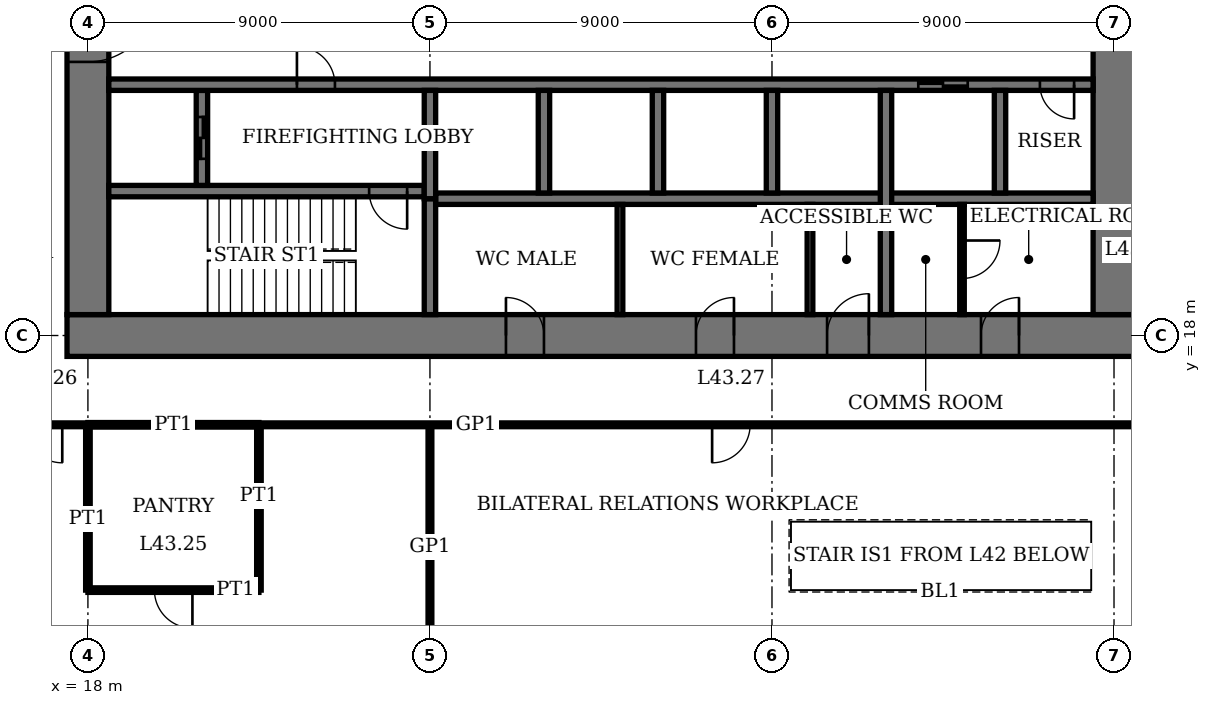
"""IFC4 building model, lengths in metres.
Left out: names, types, materials, properties, quantities, classifications, styles, units other than length and angle.
Written with IfcOpenShell. Run it as: python <this file> out.ifc"""

import sys

from ifc_helpers import new_model, si_unit, direction, frame, frame_2d, origin, place, context, subcontext, project, spatial, rectangle, extrude, element, fill, save


model = new_model("IFC4")
c1 = context("Model", 3, precision=1e-05, world=origin(), true_north=direction((0.0, 1.0)))
c2 = subcontext(c1, "Body", "Model", "MODEL_VIEW")
j1 = project(units=[si_unit("LENGTHUNIT", "METRE"), si_unit("PLANEANGLEUNIT", "RADIAN")], contexts=[c1])
p1 = place(None, origin())
s1 = spatial("IfcSite", under=j1, at=p1, CompositionType="ELEMENT")
p2 = place(p1, origin())
s2 = spatial("IfcBuilding", under=s1, at=p2, CompositionType="ELEMENT")
p3 = place(p2, frame((0.0, 0.0, 178.2)))
s3 = spatial("IfcBuildingStorey", under=s2, at=p3, CompositionType="ELEMENT", Elevation=178.2)
p4 = place(p3, frame((17.45, 18.0, 0.0), z_axis=(0.0, 0.0, 1.0), x_axis=(1.0, 0.0, 0.0)))
e1 = element("IfcWall", 1, at=p4, inside=s3, PredefinedType="SHEAR", context=c2, shape_type="SweptSolid", body=[
    extrude(rectangle(XDim=28.1, YDim=1.1, at=frame_2d((14.05, 0.0))), origin(), (0.0, 0.0, 1.0), 4.0),
])
p5 = place(p4, frame((11.55, 0.0, 0.0)))
e2 = element("IfcOpeningElement", 2, at=p5, cuts=e1, PredefinedType="OPENING", context=c2, shape_type="SweptSolid", body=[
    extrude(rectangle(XDim=1.0, YDim=2.4, at=frame_2d((0.5, 1.2))), frame((0.0, 0.56, 0.0), z_axis=(0.0, -1.0, 0.0), x_axis=(1.0, 0.0, 0.0)), (0.0, 0.0, 1.0), 1.12),
])
p6 = place(p4, frame((16.55, 0.0, 0.0)))
e3 = element("IfcOpeningElement", 3, at=p6, cuts=e1, PredefinedType="OPENING", context=c2, shape_type="SweptSolid", body=[
    extrude(rectangle(XDim=1.0, YDim=2.4, at=frame_2d((0.5, 1.2))), frame((0.0, 0.56, 0.0), z_axis=(0.0, -1.0, 0.0), x_axis=(1.0, 0.0, 0.0)), (0.0, 0.0, 1.0), 1.12),
])
p7 = place(p4, frame((20.0, 0.0, 0.0)))
e4 = element("IfcOpeningElement", 4, at=p7, cuts=e1, PredefinedType="OPENING", context=c2, shape_type="SweptSolid", body=[
    extrude(rectangle(XDim=1.1, YDim=2.4, at=frame_2d((0.55, 1.2))), frame((0.0, 0.56, 0.0), z_axis=(0.0, -1.0, 0.0), x_axis=(1.0, 0.0, 0.0)), (0.0, 0.0, 1.0), 1.12),
])
p8 = place(p4, frame((24.05, 0.0, 0.0)))
e5 = element("IfcOpeningElement", 5, at=p8, cuts=e1, PredefinedType="OPENING", context=c2, shape_type="SweptSolid", body=[
    extrude(rectangle(XDim=1.0, YDim=2.4, at=frame_2d((0.5, 1.2))), frame((0.0, 0.56, 0.0), z_axis=(0.0, -1.0, 0.0), x_axis=(1.0, 0.0, 0.0)), (0.0, 0.0, 1.0), 1.12),
])
p9 = place(p3, frame((18.0, 35.45, 0.0), z_axis=(0.0, 0.0, 1.0), x_axis=(0.0, -1.0, 0.0)))
e6 = element("IfcWall", 6, at=p9, inside=s3, PredefinedType="SHEAR", context=c2, shape_type="SweptSolid", body=[
    extrude(rectangle(XDim=16.9, YDim=1.1, at=frame_2d((8.45, 0.0))), origin(), (0.0, 0.0, 1.0), 4.0),
])
p10 = place(p9, frame((8.45, 0.0, 0.0)))
e7 = element("IfcOpeningElement", 7, at=p10, cuts=e6, PredefinedType="OPENING", context=c2, shape_type="SweptSolid", body=[
    extrude(rectangle(XDim=1.8, YDim=2.4, at=frame_2d((0.9, 1.2))), frame((0.0, 0.56, 0.0), z_axis=(0.0, -1.0, 0.0), x_axis=(1.0, 0.0, 0.0)), (0.0, 0.0, 1.0), 1.12),
])
p11 = place(p3, frame((45.0, 18.55, 0.0), z_axis=(0.0, 0.0, 1.0), x_axis=(0.0, 1.0, 0.0)))
e8 = element("IfcWall", 8, at=p11, inside=s3, PredefinedType="SHEAR", context=c2, shape_type="SweptSolid", body=[
    extrude(rectangle(XDim=16.9, YDim=1.1, at=frame_2d((8.45, 0.0))), origin(), (0.0, 0.0, 1.0), 4.0),
])
p12 = place(p11, frame((8.45, 0.0, 0.0)))
e9 = element("IfcOpeningElement", 9, at=p12, cuts=e8, PredefinedType="OPENING", context=c2, shape_type="SweptSolid", body=[
    extrude(rectangle(XDim=1.8, YDim=2.4, at=frame_2d((0.9, 1.2))), frame((0.0, 0.56, 0.0), z_axis=(0.0, -1.0, 0.0), x_axis=(1.0, 0.0, 0.0)), (0.0, 0.0, 1.0), 1.12),
])
p13 = place(p3, frame((18.55, 21.8, 0.0), z_axis=(0.0, 0.0, 1.0), x_axis=(1.0, 0.0, 0.0)))
e10 = element("IfcWall", 10, at=p13, inside=s3, PredefinedType="SHEAR", context=c2, shape_type="SweptSolid", body=[
    extrude(rectangle(XDim=8.3, YDim=0.3, at=frame_2d((4.15, 0.0))), origin(), (0.0, 0.0, 1.0), 4.0),
])
p14 = place(p13, frame((6.85, 0.0, 0.0)))
e11 = element("IfcOpeningElement", 11, at=p14, cuts=e10, PredefinedType="OPENING", context=c2, shape_type="SweptSolid", body=[
    extrude(rectangle(XDim=1.0, YDim=2.4, at=frame_2d((0.5, 1.2))), frame((0.0, 0.16, 0.0), z_axis=(0.0, -1.0, 0.0), x_axis=(1.0, 0.0, 0.0)), (0.0, 0.0, 1.0), 0.32),
])
p15 = place(p3, frame((27.0, 18.55, 0.0), z_axis=(0.0, 0.0, 1.0), x_axis=(0.0, 1.0, 0.0)))
e12 = element("IfcWall", 12, at=p15, inside=s3, PredefinedType="SHEAR", context=c2, shape_type="SweptSolid", body=[
    extrude(rectangle(XDim=3.05, YDim=0.3, at=frame_2d((1.525, 0.0))), origin(), (0.0, 0.0, 1.0), 4.0),
])
p16 = place(p3, frame((21.0, 21.95, 0.0), z_axis=(0.0, 0.0, 1.0), x_axis=(0.0, 1.0, 0.0)))
e13 = element("IfcWall", 13, at=p16, inside=s3, PredefinedType="SHEAR", context=c2, shape_type="SweptSolid", body=[
    extrude(rectangle(XDim=2.5, YDim=0.3, at=frame_2d((1.25, 0.0))), origin(), (0.0, 0.0, 1.0), 4.0),
])
p17 = place(p16, frame((0.7, 0.0, 0.0)))
e14 = element("IfcOpeningElement", 14, at=p17, cuts=e13, PredefinedType="OPENING", context=c2, shape_type="SweptSolid", body=[
    extrude(rectangle(XDim=1.1, YDim=2.4, at=frame_2d((0.55, 1.2))), frame((0.0, 0.16, 0.0), z_axis=(0.0, -1.0, 0.0), x_axis=(1.0, 0.0, 0.0)), (0.0, 0.0, 1.0), 0.32),
])
p18 = place(p3, frame((18.55, 24.6, 0.0), z_axis=(0.0, 0.0, 1.0), x_axis=(1.0, 0.0, 0.0)))
e15 = element("IfcWall", 15, at=p18, inside=s3, PredefinedType="SHEAR", context=c2, shape_type="SweptSolid", body=[
    extrude(rectangle(XDim=25.9, YDim=0.3, at=frame_2d((12.95, 0.0))), origin(), (0.0, 0.0, 1.0), 4.0),
])
p19 = place(p18, frame((4.95, 0.0, 0.0)))
e16 = element("IfcOpeningElement", 16, at=p19, cuts=e15, PredefinedType="OPENING", context=c2, shape_type="SweptSolid", body=[
    extrude(rectangle(XDim=1.0, YDim=2.4, at=frame_2d((0.5, 1.2))), frame((0.0, 0.16, 0.0), z_axis=(0.0, -1.0, 0.0), x_axis=(1.0, 0.0, 0.0)), (0.0, 0.0, 1.0), 0.32),
])
p20 = place(p18, frame((24.5, 0.0, 0.0)))
e17 = element("IfcOpeningElement", 17, at=p20, cuts=e15, PredefinedType="OPENING", context=c2, shape_type="SweptSolid", body=[
    extrude(rectangle(XDim=0.9, YDim=2.1, at=frame_2d((0.45, 1.05))), frame((0.0, 0.16, 0.0), z_axis=(0.0, -1.0, 0.0), x_axis=(1.0, 0.0, 0.0)), (0.0, 0.0, 1.0), 0.32),
])
p21 = place(p18, frame((21.3, 0.0, 0.0)))
e18 = element("IfcOpeningElement", 18, at=p21, cuts=e15, PredefinedType="OPENING", context=c2, shape_type="SweptSolid", body=[
    extrude(rectangle(XDim=1.3, YDim=2.4, at=frame_2d((0.65, 1.2))), frame((0.0, 0.16, 0.0), z_axis=(0.0, -1.0, 0.0), x_axis=(1.0, 0.0, 0.0)), (0.0, 0.0, 1.0), 0.32),
])
p22 = place(p3, frame((27.15, 21.6, 0.0), z_axis=(0.0, 0.0, 1.0), x_axis=(1.0, 0.0, 0.0)))
e19 = element("IfcWall", 19, at=p22, inside=s3, PredefinedType="SHEAR", context=c2, shape_type="SweptSolid", body=[
    extrude(rectangle(XDim=17.3, YDim=0.3, at=frame_2d((8.65, 0.0))), origin(), (0.0, 0.0, 1.0), 4.0),
])
for number, where, z_axis, x_axis in (
    (20, (30.0, 21.75, 0.0), (0.0, 0.0, 1.0), (0.0, 1.0, 0.0)),
    (21, (33.0, 21.75, 0.0), (0.0, 0.0, 1.0), (0.0, 1.0, 0.0)),
    (22, (36.0, 21.75, 0.0), (0.0, 0.0, 1.0), (0.0, 1.0, 0.0)),
):
    element("IfcWall", number, at=place(p3, frame(where, z_axis=z_axis, x_axis=x_axis)), inside=s3, PredefinedType="SHEAR", context=c2, shape_type="SweptSolid", body=[
        extrude(rectangle(XDim=2.7, YDim=0.3, at=frame_2d((1.35, 0.0))), origin(), (0.0, 0.0, 1.0), 4.0),
    ])
p23 = place(p3, frame((39.0, 18.55, 0.0), z_axis=(0.0, 0.0, 1.0), x_axis=(0.0, 1.0, 0.0)))
e23 = element("IfcWall", 23, at=p23, inside=s3, PredefinedType="SHEAR", context=c2, shape_type="SweptSolid", body=[
    extrude(rectangle(XDim=5.9, YDim=0.3, at=frame_2d((2.95, 0.0))), origin(), (0.0, 0.0, 1.0), 4.0),
])
p24 = place(p3, frame((42.0, 21.75, 0.0), z_axis=(0.0, 0.0, 1.0), x_axis=(0.0, 1.0, 0.0)))
e24 = element("IfcWall", 24, at=p24, inside=s3, PredefinedType="SHEAR", context=c2, shape_type="SweptSolid", body=[
    extrude(rectangle(XDim=2.7, YDim=0.3, at=frame_2d((1.35, 0.0))), origin(), (0.0, 0.0, 1.0), 4.0),
])
p25 = place(p3, frame((27.0, 21.6, 0.0), z_axis=(0.0, 0.0, 1.0), x_axis=(0.0, 1.0, 0.0)))
e25 = element("IfcWall", 25, at=p25, inside=s3, PredefinedType="SHEAR", context=c2, shape_type="SweptSolid", body=[
    extrude(rectangle(XDim=2.85, YDim=0.3, at=frame_2d((1.425, 0.0))), origin(), (0.0, 0.0, 1.0), 4.0),
])
p26 = place(p3, frame((18.0, 11.3, 0.0), z_axis=(0.0, 0.0, 1.0), x_axis=(1.0, 0.0, 0.0)))
e26 = element("IfcWall", 26, at=p26, inside=s3, PredefinedType="PARTITIONING", context=c2, shape_type="SweptSolid", body=[
    extrude(rectangle(XDim=4.5, YDim=0.12, at=frame_2d((2.25, 0.0))), origin(), (0.0, 0.0, 1.0), 3.75),
])
p27 = place(p26, frame((1.75, 0.0, 0.0)))
e27 = element("IfcOpeningElement", 27, at=p27, cuts=e26, PredefinedType="OPENING", context=c2, shape_type="SweptSolid", body=[
    extrude(rectangle(XDim=1.0, YDim=2.4, at=frame_2d((0.5, 1.2))), frame((0.0, 0.07, 0.0), z_axis=(0.0, -1.0, 0.0), x_axis=(1.0, 0.0, 0.0)), (0.0, 0.0, 1.0), 0.14),
])
p28 = place(p3, frame((18.0, 15.65, 0.0), z_axis=(0.0, 0.0, 1.0), x_axis=(1.0, 0.0, 0.0)))
e28 = element("IfcWall", 28, at=p28, inside=s3, PredefinedType="PARTITIONING", context=c2, shape_type="SweptSolid", body=[
    extrude(rectangle(XDim=4.5, YDim=0.12, at=frame_2d((2.25, 0.0))), origin(), (0.0, 0.0, 1.0), 3.75),
])
p29 = place(p3, frame((15.65, 15.65, 0.0), z_axis=(0.0, 0.0, 1.0), x_axis=(1.0, 0.0, 0.0)))
e29 = element("IfcWall", 29, at=p29, inside=s3, PredefinedType="PARTITIONING", context=c2, shape_type="SweptSolid", body=[
    extrude(rectangle(XDim=2.35, YDim=0.1, at=frame_2d((1.175, 0.0))), origin(), (0.0, 0.0, 1.0), 3.75),
])
p30 = place(p29, frame((0.675, 0.0, 0.0)))
e30 = element("IfcOpeningElement", 30, at=p30, cuts=e29, PredefinedType="OPENING", context=c2, shape_type="SweptSolid", body=[
    extrude(rectangle(XDim=1.0, YDim=2.4, at=frame_2d((0.5, 1.2))), frame((0.0, 0.06, 0.0), z_axis=(0.0, -1.0, 0.0), x_axis=(1.0, 0.0, 0.0)), (0.0, 0.0, 1.0), 0.12),
])
p31 = place(p3, frame((22.5, 15.65, 0.0), z_axis=(0.0, 0.0, 1.0), x_axis=(1.0, 0.0, 0.0)))
e31 = element("IfcWall", 31, at=p31, inside=s3, PredefinedType="PARTITIONING", context=c2, shape_type="SweptSolid", body=[
    extrude(rectangle(XDim=24.85, YDim=0.1, at=frame_2d((12.425, 0.0))), origin(), (0.0, 0.0, 1.0), 3.75),
])
p32 = place(p31, frame((11.925, 0.0, 0.0)))
e32 = element("IfcOpeningElement", 32, at=p32, cuts=e31, PredefinedType="OPENING", context=c2, shape_type="SweptSolid", body=[
    extrude(rectangle(XDim=1.0, YDim=2.4, at=frame_2d((0.5, 1.2))), frame((0.0, 0.06, 0.0), z_axis=(0.0, -1.0, 0.0), x_axis=(1.0, 0.0, 0.0)), (0.0, 0.0, 1.0), 0.12),
])
p33 = place(p3, frame((18.0, 11.3, 0.0), z_axis=(0.0, 0.0, 1.0), x_axis=(0.0, 1.0, 0.0)))
e33 = element("IfcWall", 33, at=p33, inside=s3, PredefinedType="PARTITIONING", context=c2, shape_type="SweptSolid", body=[
    extrude(rectangle(XDim=4.35, YDim=0.12, at=frame_2d((2.175, 0.0))), origin(), (0.0, 0.0, 1.0), 3.05),
])
p34 = place(p3, frame((22.5, 11.3, 0.0), z_axis=(0.0, 0.0, 1.0), x_axis=(0.0, 1.0, 0.0)))
e34 = element("IfcWall", 34, at=p34, inside=s3, PredefinedType="PARTITIONING", context=c2, shape_type="SweptSolid", body=[
    extrude(rectangle(XDim=4.35, YDim=0.12, at=frame_2d((2.175, 0.0))), origin(), (0.0, 0.0, 1.0), 3.75),
])
p35 = place(p3, frame((27.0, 9.8, 0.0), z_axis=(0.0, 0.0, 1.0), x_axis=(0.0, 1.0, 0.0)))
e35 = element("IfcWall", 35, at=p35, inside=s3, PredefinedType="PARTITIONING", context=c2, shape_type="SweptSolid", body=[
    extrude(rectangle(XDim=5.85, YDim=0.1, at=frame_2d((2.925, 0.0))), origin(), (0.0, 0.0, 1.0), 3.05),
])
for number, where, z_axis, x_axis in (
    (36, (32.0, 18.55, 0.0), (0.0, 0.0, 1.0), (0.0, 1.0, 0.0)),
    (37, (37.0, 18.55, 0.0), (0.0, 0.0, 1.0), (0.0, 1.0, 0.0)),
):
    element("IfcWall", number, at=place(p3, frame(where, z_axis=z_axis, x_axis=x_axis)), inside=s3, PredefinedType="PARTITIONING", context=c2, shape_type="SweptSolid", body=[
        extrude(rectangle(XDim=2.9, YDim=0.15, at=frame_2d((1.45, 0.0))), origin(), (0.0, 0.0, 1.0), 3.75),
    ])
p36 = place(p3, frame((41.0, 18.55, 0.0), z_axis=(0.0, 0.0, 1.0), x_axis=(0.0, 1.0, 0.0)))
e38 = element("IfcWall", 38, at=p36, inside=s3, PredefinedType="PARTITIONING", context=c2, shape_type="SweptSolid", body=[
    extrude(rectangle(XDim=2.9, YDim=0.12, at=frame_2d((1.45, 0.0))), origin(), (0.0, 0.0, 1.0), 3.75),
])
p37 = place(p36, frame((0.95, 0.0, 0.0)))
e39 = element("IfcOpeningElement", 39, at=p37, cuts=e38, PredefinedType="OPENING", context=c2, shape_type="SweptSolid", body=[
    extrude(rectangle(XDim=1.0, YDim=2.4, at=frame_2d((0.5, 1.2))), frame((0.0, 0.07, 0.0), z_axis=(0.0, -1.0, 0.0), x_axis=(1.0, 0.0, 0.0)), (0.0, 0.0, 1.0), 0.14),
])
p38 = place(p10, origin())
e40 = element("IfcDoor", 40, at=p38, inside=s3, OperationType="DOUBLE_DOOR_DOUBLE_SWING", PredefinedType="DOOR", context=c2, shape_type="SweptSolid", body=[
    extrude(rectangle(XDim=1.8, YDim=2.4, at=frame_2d((0.9, 1.2))), frame((0.0, 0.03, 0.0), z_axis=(0.0, -1.0, 0.0), x_axis=(1.0, 0.0, 0.0)), (0.0, 0.0, 1.0), 0.06),
    extrude(rectangle(XDim=0.04, YDim=2.4, at=frame_2d((0.02, 1.2))), frame((0.0, 0.55, 0.0), z_axis=(0.0, -1.0, 0.0), x_axis=(1.0, 0.0, 0.0)), (0.0, 0.0, 1.0), 1.1),
    extrude(rectangle(XDim=0.04, YDim=2.4, at=frame_2d((1.78, 1.2))), frame((0.0, 0.55, 0.0), z_axis=(0.0, -1.0, 0.0), x_axis=(1.0, 0.0, 0.0)), (0.0, 0.0, 1.0), 1.1),
    extrude(rectangle(XDim=1.8, YDim=0.04, at=frame_2d((0.9, 2.38))), frame((0.0, 0.55, 0.0), z_axis=(0.0, -1.0, 0.0), x_axis=(1.0, 0.0, 0.0)), (0.0, 0.0, 1.0), 1.1),
])
fill(e7, e40)
p39 = place(p5, origin())
e41 = element("IfcDoor", 41, at=p39, inside=s3, OperationType="SINGLE_SWING_RIGHT", PredefinedType="DOOR", context=c2, shape_type="SweptSolid", body=[
    extrude(rectangle(XDim=1.0, YDim=2.4, at=frame_2d((0.5, 1.2))), frame((0.0, 0.025, 0.0), z_axis=(0.0, -1.0, 0.0), x_axis=(1.0, 0.0, 0.0)), (0.0, 0.0, 1.0), 0.05),
    extrude(rectangle(XDim=0.04, YDim=2.4, at=frame_2d((0.02, 1.2))), frame((0.0, 0.4, 0.0), z_axis=(0.0, -1.0, 0.0), x_axis=(1.0, 0.0, 0.0)), (0.0, 0.0, 1.0), 0.8),
    extrude(rectangle(XDim=0.04, YDim=2.4, at=frame_2d((0.98, 1.2))), frame((0.0, 0.4, 0.0), z_axis=(0.0, -1.0, 0.0), x_axis=(1.0, 0.0, 0.0)), (0.0, 0.0, 1.0), 0.8),
    extrude(rectangle(XDim=1.0, YDim=0.04, at=frame_2d((0.5, 2.38))), frame((0.0, 0.4, 0.0), z_axis=(0.0, -1.0, 0.0), x_axis=(1.0, 0.0, 0.0)), (0.0, 0.0, 1.0), 0.8),
])
fill(e2, e41)
p40 = place(p6, origin())
e42 = element("IfcDoor", 42, at=p40, inside=s3, OperationType="SINGLE_SWING_LEFT", PredefinedType="DOOR", context=c2, shape_type="SweptSolid", body=[
    extrude(rectangle(XDim=1.0, YDim=2.4, at=frame_2d((0.5, 1.2))), frame((0.0, 0.025, 0.0), z_axis=(0.0, -1.0, 0.0), x_axis=(1.0, 0.0, 0.0)), (0.0, 0.0, 1.0), 0.05),
    extrude(rectangle(XDim=0.04, YDim=2.4, at=frame_2d((0.02, 1.2))), frame((0.0, 0.4, 0.0), z_axis=(0.0, -1.0, 0.0), x_axis=(1.0, 0.0, 0.0)), (0.0, 0.0, 1.0), 0.8),
    extrude(rectangle(XDim=0.04, YDim=2.4, at=frame_2d((0.98, 1.2))), frame((0.0, 0.4, 0.0), z_axis=(0.0, -1.0, 0.0), x_axis=(1.0, 0.0, 0.0)), (0.0, 0.0, 1.0), 0.8),
    extrude(rectangle(XDim=1.0, YDim=0.04, at=frame_2d((0.5, 2.38))), frame((0.0, 0.4, 0.0), z_axis=(0.0, -1.0, 0.0), x_axis=(1.0, 0.0, 0.0)), (0.0, 0.0, 1.0), 0.8),
])
fill(e3, e42)
p41 = place(p7, origin())
e43 = element("IfcDoor", 43, at=p41, inside=s3, OperationType="SINGLE_SWING_LEFT", PredefinedType="DOOR", context=c2, shape_type="SweptSolid", body=[
    extrude(rectangle(XDim=1.1, YDim=2.4, at=frame_2d((0.55, 1.2))), frame((0.0, 0.025, 0.0), z_axis=(0.0, -1.0, 0.0), x_axis=(1.0, 0.0, 0.0)), (0.0, 0.0, 1.0), 0.05),
    extrude(rectangle(XDim=0.04, YDim=2.4, at=frame_2d((0.02, 1.2))), frame((0.0, 0.44, 0.0), z_axis=(0.0, -1.0, 0.0), x_axis=(1.0, 0.0, 0.0)), (0.0, 0.0, 1.0), 0.88),
    extrude(rectangle(XDim=0.04, YDim=2.4, at=frame_2d((1.08, 1.2))), frame((0.0, 0.44, 0.0), z_axis=(0.0, -1.0, 0.0), x_axis=(1.0, 0.0, 0.0)), (0.0, 0.0, 1.0), 0.88),
    extrude(rectangle(XDim=1.1, YDim=0.04, at=frame_2d((0.55, 2.38))), frame((0.0, 0.44, 0.0), z_axis=(0.0, -1.0, 0.0), x_axis=(1.0, 0.0, 0.0)), (0.0, 0.0, 1.0), 0.88),
])
fill(e4, e43)
p42 = place(p8, origin())
e44 = element("IfcDoor", 44, at=p42, inside=s3, OperationType="SINGLE_SWING_LEFT", PredefinedType="DOOR", context=c2, shape_type="SweptSolid", body=[
    extrude(rectangle(XDim=1.0, YDim=2.4, at=frame_2d((0.5, 1.2))), frame((0.0, 0.025, 0.0), z_axis=(0.0, -1.0, 0.0), x_axis=(1.0, 0.0, 0.0)), (0.0, 0.0, 1.0), 0.05),
    extrude(rectangle(XDim=0.04, YDim=2.4, at=frame_2d((0.02, 1.2))), frame((0.0, 0.4, 0.0), z_axis=(0.0, -1.0, 0.0), x_axis=(1.0, 0.0, 0.0)), (0.0, 0.0, 1.0), 0.8),
    extrude(rectangle(XDim=0.04, YDim=2.4, at=frame_2d((0.98, 1.2))), frame((0.0, 0.4, 0.0), z_axis=(0.0, -1.0, 0.0), x_axis=(1.0, 0.0, 0.0)), (0.0, 0.0, 1.0), 0.8),
    extrude(rectangle(XDim=1.0, YDim=0.04, at=frame_2d((0.5, 2.38))), frame((0.0, 0.4, 0.0), z_axis=(0.0, -1.0, 0.0), x_axis=(1.0, 0.0, 0.0)), (0.0, 0.0, 1.0), 0.8),
])
fill(e5, e44)
p43 = place(p14, origin())
e45 = element("IfcDoor", 45, at=p43, inside=s3, OperationType="SINGLE_SWING_RIGHT", PredefinedType="DOOR", context=c2, shape_type="SweptSolid", body=[
    extrude(rectangle(XDim=1.0, YDim=2.4, at=frame_2d((0.5, 1.2))), frame((0.0, 0.03, 0.0), z_axis=(0.0, -1.0, 0.0), x_axis=(1.0, 0.0, 0.0)), (0.0, 0.0, 1.0), 0.06),
])
fill(e11, e45)
p44 = place(p19, origin())
e46 = element("IfcDoor", 46, at=p44, inside=s3, OperationType="SINGLE_SWING_RIGHT", PredefinedType="DOOR", context=c2, shape_type="SweptSolid", body=[
    extrude(rectangle(XDim=1.0, YDim=2.4, at=frame_2d((0.5, 1.2))), frame((0.0, 0.03, 0.0), z_axis=(0.0, -1.0, 0.0), x_axis=(1.0, 0.0, 0.0)), (0.0, 0.0, 1.0), 0.06),
])
fill(e16, e46)
p45 = place(p20, origin())
e47 = element("IfcDoor", 47, at=p45, inside=s3, OperationType="SINGLE_SWING_RIGHT", PredefinedType="DOOR", context=c2, shape_type="SweptSolid", body=[
    extrude(rectangle(XDim=0.9, YDim=2.1, at=frame_2d((0.45, 1.05))), frame((0.0, 0.03, 0.0), z_axis=(0.0, -1.0, 0.0), x_axis=(1.0, 0.0, 0.0)), (0.0, 0.0, 1.0), 0.06),
])
fill(e17, e47)
p46 = place(p27, origin())
e48 = element("IfcDoor", 48, at=p46, inside=s3, OperationType="SINGLE_SWING_RIGHT", PredefinedType="DOOR", context=c2, shape_type="SweptSolid", body=[
    extrude(rectangle(XDim=1.0, YDim=2.4, at=frame_2d((0.5, 1.2))), frame((0.0, 0.025, 0.0), z_axis=(0.0, -1.0, 0.0), x_axis=(1.0, 0.0, 0.0)), (0.0, 0.0, 1.0), 0.05),
])
fill(e27, e48)
p47 = place(p30, origin())
e49 = element("IfcDoor", 49, at=p47, inside=s3, OperationType="SINGLE_SWING_RIGHT", PredefinedType="DOOR", context=c2, shape_type="SweptSolid", body=[
    extrude(rectangle(XDim=1.0, YDim=2.4, at=frame_2d((0.5, 1.2))), frame((0.0, 0.02, 0.0), z_axis=(0.0, -1.0, 0.0), x_axis=(1.0, 0.0, 0.0)), (0.0, 0.0, 1.0), 0.04),
])
fill(e30, e49)
p48 = place(p32, origin())
e50 = element("IfcDoor", 50, at=p48, inside=s3, OperationType="SINGLE_SWING_LEFT", PredefinedType="DOOR", context=c2, shape_type="SweptSolid", body=[
    extrude(rectangle(XDim=1.0, YDim=2.4, at=frame_2d((0.5, 1.2))), frame((0.0, 0.02, 0.0), z_axis=(0.0, -1.0, 0.0), x_axis=(1.0, 0.0, 0.0)), (0.0, 0.0, 1.0), 0.04),
])
fill(e32, e50)
p49 = place(p37, origin())
e51 = element("IfcDoor", 51, at=p49, inside=s3, OperationType="SINGLE_SWING_RIGHT", PredefinedType="DOOR", context=c2, shape_type="SweptSolid", body=[
    extrude(rectangle(XDim=1.0, YDim=2.4, at=frame_2d((0.5, 1.2))), frame((0.0, 0.03, 0.0), z_axis=(0.0, -1.0, 0.0), x_axis=(1.0, 0.0, 0.0)), (0.0, 0.0, 1.0), 0.06),
])
fill(e39, e51)
p50 = place(p21, origin())
e52 = element("IfcDoor", 52, at=p50, inside=s3, OperationType="DOUBLE_DOOR_SLIDING", PredefinedType="DOOR", context=c2, shape_type="SweptSolid", body=[
    extrude(rectangle(XDim=1.3, YDim=2.4, at=frame_2d((0.65, 1.2))), frame((0.0, 0.02, 0.0), z_axis=(0.0, -1.0, 0.0), x_axis=(1.0, 0.0, 0.0)), (0.0, 0.0, 1.0), 0.04),
])
fill(e18, e52)
p51 = place(p17, origin())
e53 = element("IfcDoor", 53, at=p51, inside=s3, OperationType="DOUBLE_DOOR_SLIDING", PredefinedType="DOOR", context=c2, shape_type="SweptSolid", body=[
    extrude(rectangle(XDim=1.1, YDim=2.4, at=frame_2d((0.55, 1.2))), frame((0.0, 0.03, 0.0), z_axis=(0.0, -1.0, 0.0), x_axis=(1.0, 0.0, 0.0)), (0.0, 0.0, 1.0), 0.06),
])
fill(e14, e53)
save(model, sys.argv[1])
